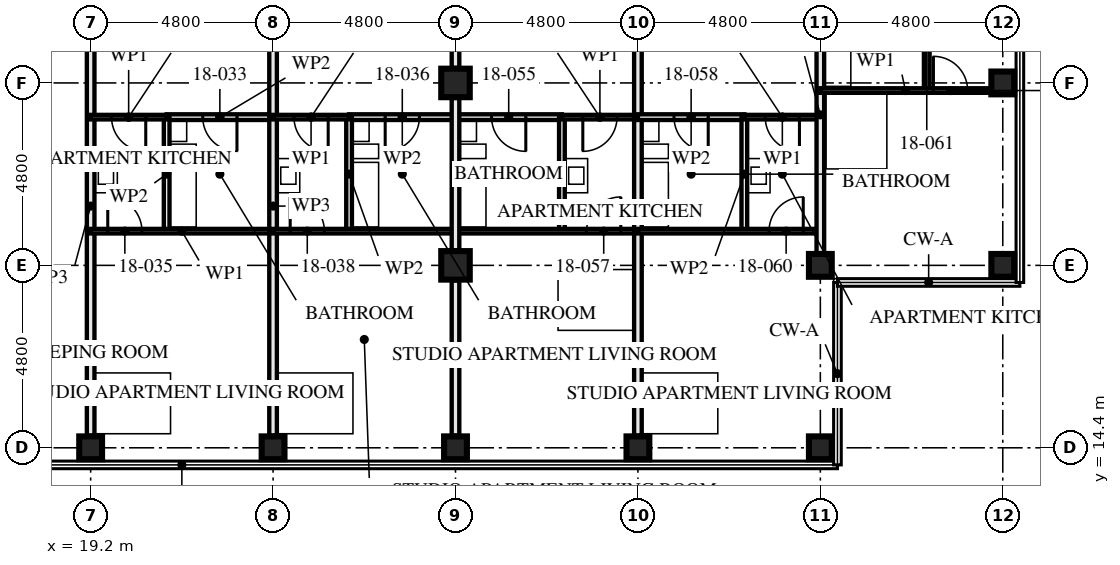
"""IFC4 building model, lengths in metres.
Left out: names, types, materials, properties, quantities, classifications, styles, units other than length and angle.
Written with IfcOpenShell. Run it as: python <this file> out.ifc"""

import sys

from ifc_helpers import new_model, si_unit, direction, frame, frame_2d, origin, origin_2d, place, context, subcontext, project, spatial, rectangle, hollow_rectangle, extrude, element, fill, save


model = new_model("IFC4")
c1 = context("Model", 3, precision=1e-05, world=origin(), true_north=direction((0.0, 1.0)))
c2 = subcontext(c1, "Body", "Model", "MODEL_VIEW")
j1 = project(units=[si_unit("LENGTHUNIT", "METRE"), si_unit("PLANEANGLEUNIT", "RADIAN")], contexts=[c1])
p1 = place(None, origin())
s1 = spatial("IfcSite", under=j1, at=p1, CompositionType="ELEMENT")
p2 = place(p1, origin())
s2 = spatial("IfcBuilding", under=s1, at=p2, CompositionType="ELEMENT")
p3 = place(p2, frame((0.0, 0.0, 69.0)))
s3 = spatial("IfcBuildingStorey", under=s2, at=p3, CompositionType="ELEMENT", Elevation=69.0)
for number, where, z_axis, x_axis in (
    (1, (19.2, 14.4, 0.0), (0.0, 0.0, 1.0), (0.0, 1.0, 0.0)),
    (2, (24.0, 14.4, 0.0), (0.0, 0.0, 1.0), (0.0, 1.0, 0.0)),
    (3, (28.8, 14.4, 0.0), (0.0, 0.0, 1.0), (0.0, 1.0, 0.0)),
):
    element("IfcColumn", number, at=place(p3, frame(where, z_axis=z_axis, x_axis=x_axis)), inside=s3, PredefinedType="COLUMN", context=c2, shape_type="SweptSolid", body=[
        extrude(hollow_rectangle(XDim=0.6, YDim=0.6, WallThickness=0.08, at=origin_2d()), origin(), (0.0, 0.0, 1.0), 3.5),
    ])
for number, where, z_axis, x_axis in (
    (4, (28.8, 19.2, 0.0), (0.0, 0.0, 1.0), (1.0, 0.0, 0.0)),
    (5, (28.8, 24.0, 0.0), (0.0, 0.0, 1.0), (1.0, 0.0, 0.0)),
):
    element("IfcColumn", number, at=place(p3, frame(where, z_axis=z_axis, x_axis=x_axis)), inside=s3, PredefinedType="COLUMN", context=c2, shape_type="SweptSolid", body=[
        extrude(hollow_rectangle(XDim=0.75, YDim=0.75, WallThickness=0.08, at=origin_2d()), origin(), (0.0, 0.0, 1.0), 3.5),
    ])
for number, where, z_axis, x_axis in (
    (6, (33.6, 14.4, 0.0), (0.0, 0.0, 1.0), (0.0, 1.0, 0.0)),
    (7, (38.4, 14.4, 0.0), (0.0, 0.0, 1.0), (0.0, 1.0, 0.0)),
    (8, (38.4, 19.2, 0.0), (0.0, 0.0, 1.0), (0.0, 1.0, 0.0)),
    (9, (43.2, 19.2, 0.0), (0.0, 0.0, 1.0), (0.0, 1.0, 0.0)),
    (10, (43.2, 24.0, 0.0), (0.0, 0.0, 1.0), (1.0, 0.0, 0.0)),
):
    element("IfcColumn", number, at=place(p3, frame(where, z_axis=z_axis, x_axis=x_axis)), inside=s3, PredefinedType="COLUMN", context=c2, shape_type="SweptSolid", body=[
        extrude(hollow_rectangle(XDim=0.6, YDim=0.6, WallThickness=0.08, at=origin_2d()), origin(), (0.0, 0.0, 1.0), 3.5),
    ])
p4 = place(p3, frame((19.2, 14.72, 0.0), z_axis=(0.0, 0.0, 1.0), x_axis=(0.0, 1.0, 0.0)))
e11 = element("IfcWall", 11, at=p4, inside=s3, PredefinedType="PARTITIONING", context=c2, shape_type="SweptSolid", body=[
    extrude(rectangle(XDim=12.08, YDim=0.2, at=frame_2d((6.04, 0.0))), origin(), (0.0, 0.0, 1.0), 2.55),
])
p5 = place(p3, frame((21.2, 20.1, 0.0), z_axis=(0.0, 0.0, 1.0), x_axis=(0.0, 1.0, 0.0)))
e12 = element("IfcWall", 12, at=p5, inside=s3, PredefinedType="PARTITIONING", context=c2, shape_type="SweptSolid", body=[
    extrude(rectangle(XDim=3.0, YDim=0.15, at=frame_2d((1.5, 0.0))), origin(), (0.0, 0.0, 1.0), 3.33),
])
p6 = place(p3, frame((21.2, 23.1, 0.0), z_axis=(0.0, 0.0, 1.0), x_axis=(1.0, 0.0, 0.0)))
e13 = element("IfcWall", 13, at=p6, inside=s3, PredefinedType="PARTITIONING", context=c2, shape_type="SweptSolid", body=[
    extrude(rectangle(XDim=2.8, YDim=0.15, at=frame_2d((1.4, 0.0))), origin(), (0.0, 0.0, 1.0), 3.33),
])
p7 = place(p6, frame((0.95, 0.0, 0.0)))
e14 = element("IfcOpeningElement", 14, at=p7, cuts=e13, PredefinedType="OPENING", context=c2, shape_type="SweptSolid", body=[
    extrude(rectangle(XDim=0.9, YDim=2.1, at=frame_2d((0.45, 1.05))), frame((0.0, 0.085, 0.0), z_axis=(0.0, -1.0, 0.0), x_axis=(1.0, 0.0, 0.0)), (0.0, 0.0, 1.0), 0.171),
])
p8 = place(p3, frame((19.2, 23.1, 0.0), z_axis=(0.0, 0.0, 1.0), x_axis=(1.0, 0.0, 0.0)))
e15 = element("IfcWall", 15, at=p8, inside=s3, PredefinedType="PARTITIONING", context=c2, shape_type="SweptSolid", body=[
    extrude(rectangle(XDim=2.0, YDim=0.12, at=frame_2d((1.0, 0.0))), origin(), (0.0, 0.0, 1.0), 3.33),
])
p9 = place(p8, frame((0.55, 0.0, 0.0)))
e16 = element("IfcOpeningElement", 16, at=p9, cuts=e15, PredefinedType="OPENING", context=c2, shape_type="SweptSolid", body=[
    extrude(rectangle(XDim=0.9, YDim=2.1, at=frame_2d((0.45, 1.05))), frame((0.0, 0.071, 0.0), z_axis=(0.0, -1.0, 0.0), x_axis=(1.0, 0.0, 0.0)), (0.0, 0.0, 1.0), 0.141),
])
p10 = place(p3, frame((19.2, 20.1, 0.0), z_axis=(0.0, 0.0, 1.0), x_axis=(1.0, 0.0, 0.0)))
e17 = element("IfcWall", 17, at=p10, inside=s3, PredefinedType="PARTITIONING", context=c2, shape_type="SweptSolid", body=[
    extrude(rectangle(XDim=4.8, YDim=0.12, at=frame_2d((2.4, 0.0))), origin(), (0.0, 0.0, 1.0), 3.33),
])
p11 = place(p10, frame((0.45, 0.0, 0.0)))
e18 = element("IfcOpeningElement", 18, at=p11, cuts=e17, PredefinedType="OPENING", context=c2, shape_type="SweptSolid", body=[
    extrude(rectangle(XDim=0.9, YDim=2.1, at=frame_2d((0.45, 1.05))), frame((0.0, 0.071, 0.0), z_axis=(0.0, -1.0, 0.0), x_axis=(1.0, 0.0, 0.0)), (0.0, 0.0, 1.0), 0.141),
])
p12 = place(p3, frame((24.0, 14.72, 0.0), z_axis=(0.0, 0.0, 1.0), x_axis=(0.0, 1.0, 0.0)))
e19 = element("IfcWall", 19, at=p12, inside=s3, PredefinedType="PARTITIONING", context=c2, shape_type="SweptSolid", body=[
    extrude(rectangle(XDim=12.08, YDim=0.2, at=frame_2d((6.04, 0.0))), origin(), (0.0, 0.0, 1.0), 2.55),
])
p13 = place(p3, frame((26.0, 20.1, 0.0), z_axis=(0.0, 0.0, 1.0), x_axis=(0.0, 1.0, 0.0)))
e20 = element("IfcWall", 20, at=p13, inside=s3, PredefinedType="PARTITIONING", context=c2, shape_type="SweptSolid", body=[
    extrude(rectangle(XDim=3.0, YDim=0.15, at=frame_2d((1.5, 0.0))), origin(), (0.0, 0.0, 1.0), 3.33),
])
p14 = place(p3, frame((26.0, 23.1, 0.0), z_axis=(0.0, 0.0, 1.0), x_axis=(1.0, 0.0, 0.0)))
e21 = element("IfcWall", 21, at=p14, inside=s3, PredefinedType="PARTITIONING", context=c2, shape_type="SweptSolid", body=[
    extrude(rectangle(XDim=2.8, YDim=0.15, at=frame_2d((1.4, 0.0))), origin(), (0.0, 0.0, 1.0), 3.33),
])
p15 = place(p14, frame((0.95, 0.0, 0.0)))
e22 = element("IfcOpeningElement", 22, at=p15, cuts=e21, PredefinedType="OPENING", context=c2, shape_type="SweptSolid", body=[
    extrude(rectangle(XDim=0.9, YDim=2.1, at=frame_2d((0.45, 1.05))), frame((0.0, 0.085, 0.0), z_axis=(0.0, -1.0, 0.0), x_axis=(1.0, 0.0, 0.0)), (0.0, 0.0, 1.0), 0.171),
])
p16 = place(p3, frame((24.0, 23.1, 0.0), z_axis=(0.0, 0.0, 1.0), x_axis=(1.0, 0.0, 0.0)))
e23 = element("IfcWall", 23, at=p16, inside=s3, PredefinedType="PARTITIONING", context=c2, shape_type="SweptSolid", body=[
    extrude(rectangle(XDim=2.0, YDim=0.12, at=frame_2d((1.0, 0.0))), origin(), (0.0, 0.0, 1.0), 3.33),
])
p17 = place(p16, frame((0.55, 0.0, 0.0)))
e24 = element("IfcOpeningElement", 24, at=p17, cuts=e23, PredefinedType="OPENING", context=c2, shape_type="SweptSolid", body=[
    extrude(rectangle(XDim=0.9, YDim=2.1, at=frame_2d((0.45, 1.05))), frame((0.0, 0.071, 0.0), z_axis=(0.0, -1.0, 0.0), x_axis=(1.0, 0.0, 0.0)), (0.0, 0.0, 1.0), 0.141),
])
p18 = place(p3, frame((24.0, 20.1, 0.0), z_axis=(0.0, 0.0, 1.0), x_axis=(1.0, 0.0, 0.0)))
e25 = element("IfcWall", 25, at=p18, inside=s3, PredefinedType="PARTITIONING", context=c2, shape_type="SweptSolid", body=[
    extrude(rectangle(XDim=4.8, YDim=0.12, at=frame_2d((2.4, 0.0))), origin(), (0.0, 0.0, 1.0), 3.33),
])
p19 = place(p18, frame((0.45, 0.0, 0.0)))
e26 = element("IfcOpeningElement", 26, at=p19, cuts=e25, PredefinedType="OPENING", context=c2, shape_type="SweptSolid", body=[
    extrude(rectangle(XDim=0.9, YDim=2.1, at=frame_2d((0.45, 1.05))), frame((0.0, 0.071, 0.0), z_axis=(0.0, -1.0, 0.0), x_axis=(1.0, 0.0, 0.0)), (0.0, 0.0, 1.0), 0.141),
])
p20 = place(p3, frame((31.6, 20.1, 0.0), z_axis=(0.0, 0.0, 1.0), x_axis=(0.0, 1.0, 0.0)))
e27 = element("IfcWall", 27, at=p20, inside=s3, PredefinedType="PARTITIONING", context=c2, shape_type="SweptSolid", body=[
    extrude(rectangle(XDim=3.0, YDim=0.15, at=frame_2d((1.5, 0.0))), origin(), (0.0, 0.0, 1.0), 3.33),
])
p21 = place(p3, frame((28.8, 23.1, 0.0), z_axis=(0.0, 0.0, 1.0), x_axis=(1.0, 0.0, 0.0)))
e28 = element("IfcWall", 28, at=p21, inside=s3, PredefinedType="PARTITIONING", context=c2, shape_type="SweptSolid", body=[
    extrude(rectangle(XDim=2.8, YDim=0.15, at=frame_2d((1.4, 0.0))), origin(), (0.0, 0.0, 1.0), 3.33),
])
p22 = place(p21, frame((0.95, 0.0, 0.0)))
e29 = element("IfcOpeningElement", 29, at=p22, cuts=e28, PredefinedType="OPENING", context=c2, shape_type="SweptSolid", body=[
    extrude(rectangle(XDim=0.9, YDim=2.1, at=frame_2d((0.45, 1.05))), frame((0.0, 0.085, 0.0), z_axis=(0.0, -1.0, 0.0), x_axis=(1.0, 0.0, 0.0)), (0.0, 0.0, 1.0), 0.171),
])
p23 = place(p3, frame((31.6, 23.1, 0.0), z_axis=(0.0, 0.0, 1.0), x_axis=(1.0, 0.0, 0.0)))
e30 = element("IfcWall", 30, at=p23, inside=s3, PredefinedType="PARTITIONING", context=c2, shape_type="SweptSolid", body=[
    extrude(rectangle(XDim=2.0, YDim=0.12, at=frame_2d((1.0, 0.0))), origin(), (0.0, 0.0, 1.0), 3.33),
])
p24 = place(p23, frame((0.55, 0.0, 0.0)))
e31 = element("IfcOpeningElement", 31, at=p24, cuts=e30, PredefinedType="OPENING", context=c2, shape_type="SweptSolid", body=[
    extrude(rectangle(XDim=0.9, YDim=2.1, at=frame_2d((0.45, 1.05))), frame((0.0, 0.071, 0.0), z_axis=(0.0, -1.0, 0.0), x_axis=(1.0, 0.0, 0.0)), (0.0, 0.0, 1.0), 0.141),
])
p25 = place(p3, frame((28.8, 20.1, 0.0), z_axis=(0.0, 0.0, 1.0), x_axis=(1.0, 0.0, 0.0)))
e32 = element("IfcWall", 32, at=p25, inside=s3, PredefinedType="PARTITIONING", context=c2, shape_type="SweptSolid", body=[
    extrude(rectangle(XDim=4.8, YDim=0.12, at=frame_2d((2.4, 0.0))), origin(), (0.0, 0.0, 1.0), 3.33),
])
p26 = place(p25, frame((3.45, 0.0, 0.0)))
e33 = element("IfcOpeningElement", 33, at=p26, cuts=e32, PredefinedType="OPENING", context=c2, shape_type="SweptSolid", body=[
    extrude(rectangle(XDim=0.9, YDim=2.1, at=frame_2d((0.45, 1.05))), frame((0.0, 0.071, 0.0), z_axis=(0.0, -1.0, 0.0), x_axis=(1.0, 0.0, 0.0)), (0.0, 0.0, 1.0), 0.141),
])
p27 = place(p3, frame((33.6, 14.72, 0.0), z_axis=(0.0, 0.0, 1.0), x_axis=(0.0, 1.0, 0.0)))
e34 = element("IfcWall", 34, at=p27, inside=s3, PredefinedType="PARTITIONING", context=c2, shape_type="SweptSolid", body=[
    extrude(rectangle(XDim=12.08, YDim=0.2, at=frame_2d((6.04, 0.0))), origin(), (0.0, 0.0, 1.0), 2.55),
])
p28 = place(p3, frame((36.4, 20.1, 0.0), z_axis=(0.0, 0.0, 1.0), x_axis=(0.0, 1.0, 0.0)))
e35 = element("IfcWall", 35, at=p28, inside=s3, PredefinedType="PARTITIONING", context=c2, shape_type="SweptSolid", body=[
    extrude(rectangle(XDim=3.0, YDim=0.15, at=frame_2d((1.5, 0.0))), origin(), (0.0, 0.0, 1.0), 3.33),
])
p29 = place(p3, frame((33.6, 23.1, 0.0), z_axis=(0.0, 0.0, 1.0), x_axis=(1.0, 0.0, 0.0)))
e36 = element("IfcWall", 36, at=p29, inside=s3, PredefinedType="PARTITIONING", context=c2, shape_type="SweptSolid", body=[
    extrude(rectangle(XDim=2.8, YDim=0.15, at=frame_2d((1.4, 0.0))), origin(), (0.0, 0.0, 1.0), 3.33),
])
p30 = place(p29, frame((0.95, 0.0, 0.0)))
e37 = element("IfcOpeningElement", 37, at=p30, cuts=e36, PredefinedType="OPENING", context=c2, shape_type="SweptSolid", body=[
    extrude(rectangle(XDim=0.9, YDim=2.1, at=frame_2d((0.45, 1.05))), frame((0.0, 0.085, 0.0), z_axis=(0.0, -1.0, 0.0), x_axis=(1.0, 0.0, 0.0)), (0.0, 0.0, 1.0), 0.171),
])
p31 = place(p3, frame((36.4, 23.1, 0.0), z_axis=(0.0, 0.0, 1.0), x_axis=(1.0, 0.0, 0.0)))
e38 = element("IfcWall", 38, at=p31, inside=s3, PredefinedType="PARTITIONING", context=c2, shape_type="SweptSolid", body=[
    extrude(rectangle(XDim=2.0, YDim=0.12, at=frame_2d((1.0, 0.0))), origin(), (0.0, 0.0, 1.0), 3.33),
])
p32 = place(p31, frame((0.55, 0.0, 0.0)))
e39 = element("IfcOpeningElement", 39, at=p32, cuts=e38, PredefinedType="OPENING", context=c2, shape_type="SweptSolid", body=[
    extrude(rectangle(XDim=0.9, YDim=2.1, at=frame_2d((0.45, 1.05))), frame((0.0, 0.071, 0.0), z_axis=(0.0, -1.0, 0.0), x_axis=(1.0, 0.0, 0.0)), (0.0, 0.0, 1.0), 0.141),
])
p33 = place(p3, frame((33.6, 20.1, 0.0), z_axis=(0.0, 0.0, 1.0), x_axis=(1.0, 0.0, 0.0)))
e40 = element("IfcWall", 40, at=p33, inside=s3, PredefinedType="PARTITIONING", context=c2, shape_type="SweptSolid", body=[
    extrude(rectangle(XDim=4.8, YDim=0.12, at=frame_2d((2.4, 0.0))), origin(), (0.0, 0.0, 1.0), 3.33),
])
p34 = place(p33, frame((3.45, 0.0, 0.0)))
e41 = element("IfcOpeningElement", 41, at=p34, cuts=e40, PredefinedType="OPENING", context=c2, shape_type="SweptSolid", body=[
    extrude(rectangle(XDim=0.9, YDim=2.1, at=frame_2d((0.45, 1.05))), frame((0.0, 0.071, 0.0), z_axis=(0.0, -1.0, 0.0), x_axis=(1.0, 0.0, 0.0)), (0.0, 0.0, 1.0), 0.141),
])
p35 = place(p3, frame((38.4, 19.52, 0.0), z_axis=(0.0, 0.0, 1.0), x_axis=(0.0, 1.0, 0.0)))
e42 = element("IfcWall", 42, at=p35, inside=s3, PredefinedType="PARTITIONING", context=c2, shape_type="SweptSolid", body=[
    extrude(rectangle(XDim=7.28, YDim=0.2, at=frame_2d((3.64, 0.0))), origin(), (0.0, 0.0, 1.0), 2.55),
])
p36 = place(p3, frame((41.2, 23.8, 0.0), z_axis=(0.0, 0.0, 1.0), x_axis=(0.0, 1.0, 0.0)))
e43 = element("IfcWall", 43, at=p36, inside=s3, PredefinedType="PARTITIONING", context=c2, shape_type="SweptSolid", body=[
    extrude(rectangle(XDim=3.0, YDim=0.15, at=frame_2d((1.5, 0.0))), origin(), (0.0, 0.0, 1.0), 2.55),
])
p37 = place(p36, frame((1.05, 0.0, 0.0)))
e44 = element("IfcOpeningElement", 44, at=p37, cuts=e43, PredefinedType="OPENING", context=c2, shape_type="SweptSolid", body=[
    extrude(rectangle(XDim=0.9, YDim=2.1, at=frame_2d((0.45, 1.05))), frame((0.0, 0.085, 0.0), z_axis=(0.0, -1.0, 0.0), x_axis=(1.0, 0.0, 0.0)), (0.0, 0.0, 1.0), 0.171),
])
p38 = place(p3, frame((38.4, 23.8, 0.0), z_axis=(0.0, 0.0, 1.0), x_axis=(1.0, 0.0, 0.0)))
e45 = element("IfcWall", 45, at=p38, inside=s3, PredefinedType="PARTITIONING", context=c2, shape_type="SweptSolid", body=[
    extrude(rectangle(XDim=4.48, YDim=0.12, at=frame_2d((2.24, 0.0))), origin(), (0.0, 0.0, 1.0), 3.33),
])
p39 = place(p38, frame((2.975, 0.0, 0.0)))
e46 = element("IfcOpeningElement", 46, at=p39, cuts=e45, PredefinedType="OPENING", context=c2, shape_type="SweptSolid", body=[
    extrude(rectangle(XDim=0.9, YDim=2.1, at=frame_2d((0.45, 1.05))), frame((0.0, 0.071, 0.0), z_axis=(0.0, -1.0, 0.0), x_axis=(1.0, 0.0, 0.0)), (0.0, 0.0, 1.0), 0.141),
])
p40 = place(p3, frame((28.8, 14.72, 0.0), z_axis=(0.0, 0.0, 1.0), x_axis=(0.0, 1.0, 0.0)))
e47 = element("IfcWall", 47, at=p40, inside=s3, PredefinedType="PARTITIONING", context=c2, shape_type="SweptSolid", body=[
    extrude(rectangle(XDim=4.085, YDim=0.2, at=frame_2d((2.042, 0.0))), origin(), (0.0, 0.0, 1.0), 2.32),
])
p41 = place(p3, frame((28.8, 19.595, 0.0), z_axis=(0.0, 0.0, 1.0), x_axis=(0.0, 1.0, 0.0)))
e48 = element("IfcWall", 48, at=p41, inside=s3, PredefinedType="PARTITIONING", context=c2, shape_type="SweptSolid", body=[
    extrude(rectangle(XDim=4.01, YDim=0.2, at=frame_2d((2.005, 0.0))), origin(), (0.0, 0.0, 1.0), 2.32),
])
p42 = place(p3, frame((28.8, 24.395, 0.0), z_axis=(0.0, 0.0, 1.0), x_axis=(0.0, 1.0, 0.0)))
e49 = element("IfcWall", 49, at=p42, inside=s3, PredefinedType="PARTITIONING", context=c2, shape_type="SweptSolid", body=[
    extrude(rectangle(XDim=2.505, YDim=0.2, at=frame_2d((1.252, 0.0))), origin(), (0.0, 0.0, 1.0), 2.32),
])
p43 = place(p7, frame((0.9, 0.0, 0.0), z_axis=(0.0, 0.0, 1.0), x_axis=(-1.0, 0.0, 0.0)))
e50 = element("IfcDoor", 50, at=p43, inside=s3, OperationType="SINGLE_SWING_RIGHT", PredefinedType="DOOR", context=c2, shape_type="SweptSolid", body=[
    extrude(rectangle(XDim=0.9, YDim=2.1, at=frame_2d((0.45, 1.05))), frame((0.0, 0.022, 0.0), z_axis=(0.0, -1.0, 0.0), x_axis=(1.0, 0.0, 0.0)), (0.0, 0.0, 1.0), 0.044),
])
fill(e14, e50)
p44 = place(p9, frame((0.9, 0.0, 0.0), z_axis=(0.0, 0.0, 1.0), x_axis=(-1.0, 0.0, 0.0)))
e51 = element("IfcDoor", 51, at=p44, inside=s3, OperationType="SINGLE_SWING_RIGHT", PredefinedType="DOOR", context=c2, shape_type="SweptSolid", body=[
    extrude(rectangle(XDim=0.9, YDim=2.1, at=frame_2d((0.45, 1.05))), frame((0.0, 0.022, 0.0), z_axis=(0.0, -1.0, 0.0), x_axis=(1.0, 0.0, 0.0)), (0.0, 0.0, 1.0), 0.044),
])
fill(e16, e51)
p45 = place(p11, origin())
e52 = element("IfcDoor", 52, at=p45, inside=s3, OperationType="SINGLE_SWING_RIGHT", PredefinedType="DOOR", context=c2, shape_type="SweptSolid", body=[
    extrude(rectangle(XDim=0.9, YDim=2.1, at=frame_2d((0.45, 1.05))), frame((0.0, 0.022, 0.0), z_axis=(0.0, -1.0, 0.0), x_axis=(1.0, 0.0, 0.0)), (0.0, 0.0, 1.0), 0.044),
])
fill(e18, e52)
p46 = place(p15, frame((0.9, 0.0, 0.0), z_axis=(0.0, 0.0, 1.0), x_axis=(-1.0, 0.0, 0.0)))
e53 = element("IfcDoor", 53, at=p46, inside=s3, OperationType="SINGLE_SWING_LEFT", PredefinedType="DOOR", context=c2, shape_type="SweptSolid", body=[
    extrude(rectangle(XDim=0.9, YDim=2.1, at=frame_2d((0.45, 1.05))), frame((0.0, 0.022, 0.0), z_axis=(0.0, -1.0, 0.0), x_axis=(1.0, 0.0, 0.0)), (0.0, 0.0, 1.0), 0.044),
])
fill(e22, e53)
p47 = place(p17, frame((0.9, 0.0, 0.0), z_axis=(0.0, 0.0, 1.0), x_axis=(-1.0, 0.0, 0.0)))
e54 = element("IfcDoor", 54, at=p47, inside=s3, OperationType="SINGLE_SWING_RIGHT", PredefinedType="DOOR", context=c2, shape_type="SweptSolid", body=[
    extrude(rectangle(XDim=0.9, YDim=2.1, at=frame_2d((0.45, 1.05))), frame((0.0, 0.022, 0.0), z_axis=(0.0, -1.0, 0.0), x_axis=(1.0, 0.0, 0.0)), (0.0, 0.0, 1.0), 0.044),
])
fill(e24, e54)
p48 = place(p19, origin())
e55 = element("IfcDoor", 55, at=p48, inside=s3, OperationType="SINGLE_SWING_RIGHT", PredefinedType="DOOR", context=c2, shape_type="SweptSolid", body=[
    extrude(rectangle(XDim=0.9, YDim=2.1, at=frame_2d((0.45, 1.05))), frame((0.0, 0.022, 0.0), z_axis=(0.0, -1.0, 0.0), x_axis=(1.0, 0.0, 0.0)), (0.0, 0.0, 1.0), 0.044),
])
fill(e26, e55)
p49 = place(p22, frame((0.9, 0.0, 0.0), z_axis=(0.0, 0.0, 1.0), x_axis=(-1.0, 0.0, 0.0)))
e56 = element("IfcDoor", 56, at=p49, inside=s3, OperationType="SINGLE_SWING_RIGHT", PredefinedType="DOOR", context=c2, shape_type="SweptSolid", body=[
    extrude(rectangle(XDim=0.9, YDim=2.1, at=frame_2d((0.45, 1.05))), frame((0.0, 0.022, 0.0), z_axis=(0.0, -1.0, 0.0), x_axis=(1.0, 0.0, 0.0)), (0.0, 0.0, 1.0), 0.044),
])
fill(e29, e56)
p50 = place(p24, frame((0.9, 0.0, 0.0), z_axis=(0.0, 0.0, 1.0), x_axis=(-1.0, 0.0, 0.0)))
e57 = element("IfcDoor", 57, at=p50, inside=s3, OperationType="SINGLE_SWING_LEFT", PredefinedType="DOOR", context=c2, shape_type="SweptSolid", body=[
    extrude(rectangle(XDim=0.9, YDim=2.1, at=frame_2d((0.45, 1.05))), frame((0.0, 0.022, 0.0), z_axis=(0.0, -1.0, 0.0), x_axis=(1.0, 0.0, 0.0)), (0.0, 0.0, 1.0), 0.044),
])
fill(e31, e57)
p51 = place(p26, origin())
e58 = element("IfcDoor", 58, at=p51, inside=s3, OperationType="SINGLE_SWING_LEFT", PredefinedType="DOOR", context=c2, shape_type="SweptSolid", body=[
    extrude(rectangle(XDim=0.9, YDim=2.1, at=frame_2d((0.45, 1.05))), frame((0.0, 0.022, 0.0), z_axis=(0.0, -1.0, 0.0), x_axis=(1.0, 0.0, 0.0)), (0.0, 0.0, 1.0), 0.044),
])
fill(e33, e58)
p52 = place(p30, frame((0.9, 0.0, 0.0), z_axis=(0.0, 0.0, 1.0), x_axis=(-1.0, 0.0, 0.0)))
e59 = element("IfcDoor", 59, at=p52, inside=s3, OperationType="SINGLE_SWING_RIGHT", PredefinedType="DOOR", context=c2, shape_type="SweptSolid", body=[
    extrude(rectangle(XDim=0.9, YDim=2.1, at=frame_2d((0.45, 1.05))), frame((0.0, 0.022, 0.0), z_axis=(0.0, -1.0, 0.0), x_axis=(1.0, 0.0, 0.0)), (0.0, 0.0, 1.0), 0.044),
])
fill(e37, e59)
p53 = place(p32, frame((0.9, 0.0, 0.0), z_axis=(0.0, 0.0, 1.0), x_axis=(-1.0, 0.0, 0.0)))
e60 = element("IfcDoor", 60, at=p53, inside=s3, OperationType="SINGLE_SWING_RIGHT", PredefinedType="DOOR", context=c2, shape_type="SweptSolid", body=[
    extrude(rectangle(XDim=0.9, YDim=2.1, at=frame_2d((0.45, 1.05))), frame((0.0, 0.022, 0.0), z_axis=(0.0, -1.0, 0.0), x_axis=(1.0, 0.0, 0.0)), (0.0, 0.0, 1.0), 0.044),
])
fill(e39, e60)
p54 = place(p34, origin())
e61 = element("IfcDoor", 61, at=p54, inside=s3, OperationType="SINGLE_SWING_LEFT", PredefinedType="DOOR", context=c2, shape_type="SweptSolid", body=[
    extrude(rectangle(XDim=0.9, YDim=2.1, at=frame_2d((0.45, 1.05))), frame((0.0, 0.022, 0.0), z_axis=(0.0, -1.0, 0.0), x_axis=(1.0, 0.0, 0.0)), (0.0, 0.0, 1.0), 0.044),
])
fill(e41, e61)
p55 = place(p39, origin())
e62 = element("IfcDoor", 62, at=p55, inside=s3, OperationType="SINGLE_SWING_RIGHT", PredefinedType="DOOR", context=c2, shape_type="SweptSolid", body=[
    extrude(rectangle(XDim=0.9, YDim=2.1, at=frame_2d((0.45, 1.05))), frame((0.0, 0.022, 0.0), z_axis=(0.0, -1.0, 0.0), x_axis=(1.0, 0.0, 0.0)), (0.0, 0.0, 1.0), 0.044),
])
fill(e46, e62)
save(model, sys.argv[1])
